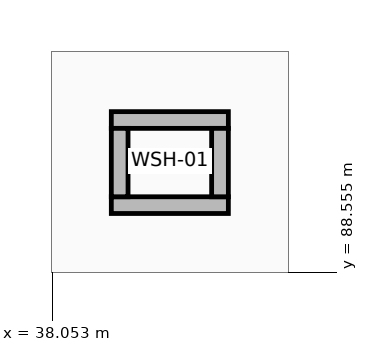
"""IFC4 building model, lengths in metres.
Left out: names, types, materials, properties, quantities, classifications, styles, units other than length and angle.
Written with IfcOpenShell. Run it as: python <this file> out.ifc"""

import sys

from ifc_helpers import new_model, si_unit, direction, frame, frame_2d, origin, place, context, subcontext, project, spatial, rectangle, extrude, element, save


model = new_model("IFC4")
c1 = context("Model", 3, precision=1e-05, world=origin(), true_north=direction((0.0, 1.0)))
c2 = subcontext(c1, "Body", "Model", "MODEL_VIEW")
j1 = project(units=[si_unit("LENGTHUNIT", "METRE"), si_unit("PLANEANGLEUNIT", "RADIAN")], contexts=[c1])
p1 = place(None, origin())
s1 = spatial("IfcSite", under=j1, at=p1, CompositionType="ELEMENT")
p2 = place(p1, origin())
s2 = spatial("IfcBuilding", under=s1, at=p2, CompositionType="ELEMENT")
p3 = place(p2, frame((0.0, 0.0, 13.5)))
s3 = spatial("IfcBuildingStorey", under=s2, at=p3, CompositionType="ELEMENT", Elevation=13.5)
for number, where, z_axis, x_axis in (
    (1, (38.83, 89.44, 0.0), (0.0, 0.0, 1.0), (1.0, 0.0, 0.0)),
    (2, (38.83, 90.56, 0.0), (0.0, 0.0, 1.0), (1.0, 0.0, 0.0)),
):
    element("IfcWall", number, at=place(p3, frame(where, z_axis=z_axis, x_axis=x_axis)), inside=s3, PredefinedType="STANDARD", context=c2, shape_type="SweptSolid", body=[
        extrude(rectangle(XDim=1.54, YDim=0.22, at=frame_2d((0.77, 0.0))), origin(), (0.0, 0.0, 1.0), 3.26),
    ])
for number, where, z_axis, x_axis in (
    (3, (38.94, 89.55, 0.0), (0.0, 0.0, 1.0), (0.0, 1.0, 0.0)),
    (4, (40.26, 89.55, 0.0), (0.0, 0.0, 1.0), (0.0, 1.0, 0.0)),
):
    element("IfcWall", number, at=place(p3, frame(where, z_axis=z_axis, x_axis=x_axis)), inside=s3, PredefinedType="STANDARD", context=c2, shape_type="SweptSolid", body=[
        extrude(rectangle(XDim=0.9, YDim=0.22, at=frame_2d((0.45, 0.0))), origin(), (0.0, 0.0, 1.0), 3.26),
    ])
save(model, sys.argv[1])
